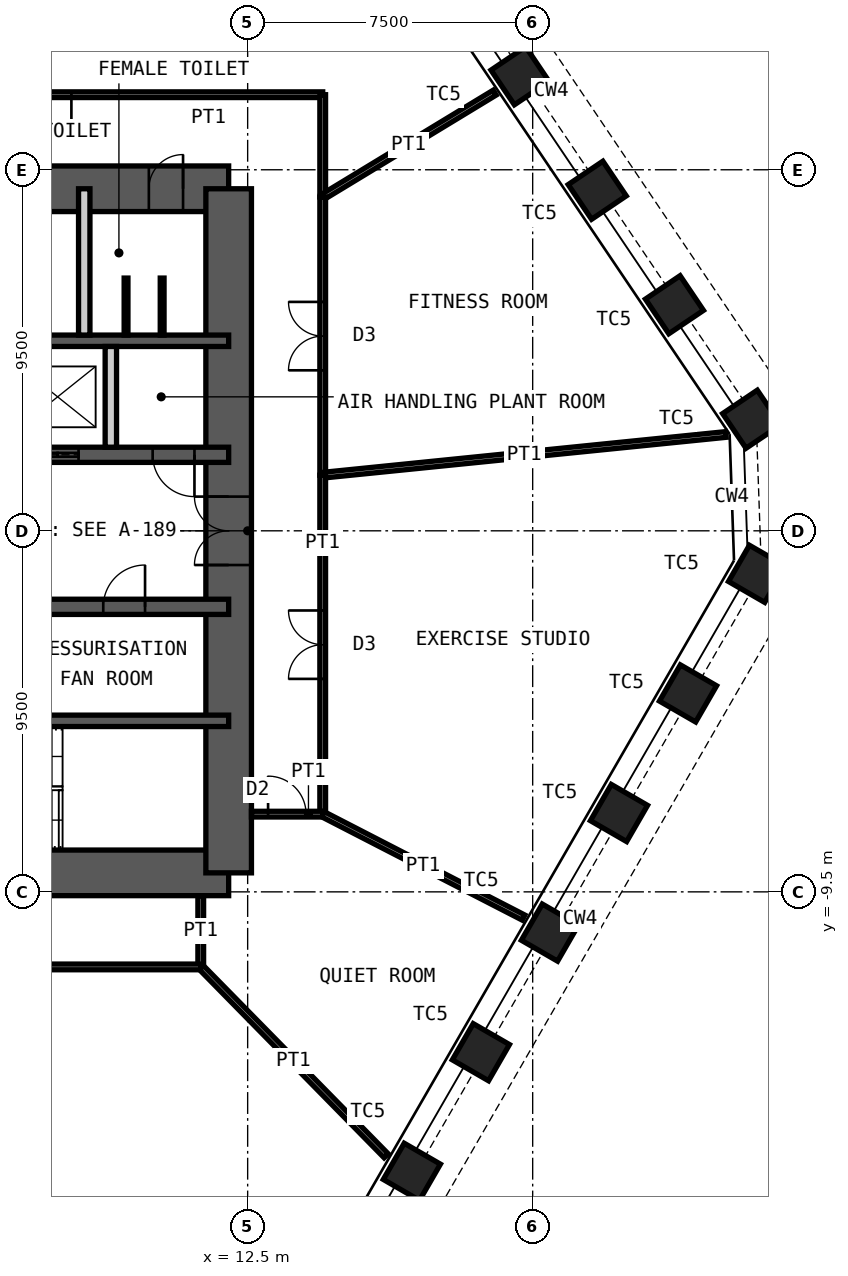
"""IFC4 building model, lengths in metres.
Left out: names, types, materials, properties, quantities, classifications, styles, units other than length and angle.
Written with IfcOpenShell. Run it as: python <this file> out.ifc"""

import sys

from ifc_helpers import new_model, si_unit, direction, frame, frame_2d, origin, origin_2d, place, context, subcontext, project, spatial, rectangle, hollow_rectangle, extrude, element, fill, save


model = new_model("IFC4")
c1 = context("Model", 3, precision=1e-05, world=origin(), true_north=direction((0.0, 1.0)))
c2 = subcontext(c1, "Body", "Model", "MODEL_VIEW")
j1 = project(units=[si_unit("LENGTHUNIT", "METRE"), si_unit("PLANEANGLEUNIT", "RADIAN")], contexts=[c1])
p1 = place(None, origin())
s1 = spatial("IfcSite", under=j1, at=p1, CompositionType="ELEMENT")
p2 = place(p1, origin())
s2 = spatial("IfcBuilding", under=s1, at=p2, CompositionType="ELEMENT")
p3 = place(p2, frame((0.0, 0.0, 218.2)))
s3 = spatial("IfcBuildingStorey", under=s2, at=p3, CompositionType="ELEMENT", Elevation=218.2)
for number, where, z_axis, x_axis in (
    (1, (19.667, 11.973, 0.0), (0.0, 0.0, 1.0), (-0.559, 0.829, 0.0)),
    (2, (21.699, 8.961, 0.0), (0.0, 0.0, 1.0), (-0.559, 0.829, 0.0)),
    (3, (23.731, 5.948, 0.0), (0.0, 0.0, 1.0), (-0.559, 0.829, 0.0)),
    (4, (25.762, 2.936, 0.0), (0.0, 0.0, 1.0), (-0.559, 0.829, 0.0)),
    (5, (25.905, -1.132, 0.0), (0.0, 0.0, 1.0), (0.5, 0.866, 0.0)),
    (6, (24.088, -4.279, 0.0), (0.0, 0.0, 1.0), (0.5, 0.866, 0.0)),
    (7, (22.271, -7.426, 0.0), (0.0, 0.0, 1.0), (0.5, 0.866, 0.0)),
    (8, (20.454, -10.572, 0.0), (0.0, 0.0, 1.0), (0.5, 0.866, 0.0)),
    (9, (18.637, -13.719, 0.0), (0.0, 0.0, 1.0), (0.5, 0.866, 0.0)),
    (10, (16.821, -16.866, 0.0), (0.0, 0.0, 1.0), (0.5, 0.866, 0.0)),
):
    element("IfcColumn", number, at=place(p3, frame(where, z_axis=z_axis, x_axis=x_axis)), inside=s3, PredefinedType="COLUMN", context=c2, shape_type="SweptSolid", body=[
        extrude(hollow_rectangle(XDim=1.1, YDim=1.1, WallThickness=0.07, at=origin_2d()), origin(), (0.0, 0.0, 1.0), 4.2),
    ])
p4 = place(p3, frame((-12.0, 9.0, 0.0), z_axis=(0.0, 0.0, 1.0), x_axis=(1.0, 0.0, 0.0)))
e11 = element("IfcWall", 11, at=p4, inside=s3, PredefinedType="SHEAR", context=c2, shape_type="SweptSolid", body=[
    extrude(rectangle(XDim=24.0, YDim=1.2, at=frame_2d((12.0, 0.0))), origin(), (0.0, 0.0, 1.0), 4.2),
])
p5 = place(p4, frame((10.4, 0.0, 0.0)))
e12 = element("IfcOpeningElement", 12, at=p5, cuts=e11, PredefinedType="OPENING", context=c2, shape_type="SweptSolid", body=[
    extrude(rectangle(XDim=1.0, YDim=2.1, at=frame_2d((0.5, 1.05))), frame((0.0, 0.61, 0.0), z_axis=(0.0, -1.0, 0.0), x_axis=(1.0, 0.0, 0.0)), (0.0, 0.0, 1.0), 1.22),
])
p6 = place(p4, frame((17.6, 0.0, 0.0)))
e13 = element("IfcOpeningElement", 13, at=p6, cuts=e11, PredefinedType="OPENING", context=c2, shape_type="SweptSolid", body=[
    extrude(rectangle(XDim=0.9, YDim=2.1, at=frame_2d((0.45, 1.05))), frame((0.0, 0.61, 0.0), z_axis=(0.0, -1.0, 0.0), x_axis=(1.0, 0.0, 0.0)), (0.0, 0.0, 1.0), 1.22),
])
p7 = place(p4, frame((21.9, 0.0, 0.0)))
e14 = element("IfcOpeningElement", 14, at=p7, cuts=e11, PredefinedType="OPENING", context=c2, shape_type="SweptSolid", body=[
    extrude(rectangle(XDim=0.9, YDim=2.1, at=frame_2d((0.45, 1.05))), frame((0.0, 0.61, 0.0), z_axis=(0.0, -1.0, 0.0), x_axis=(1.0, 0.0, 0.0)), (0.0, 0.0, 1.0), 1.22),
])
p8 = place(p3, frame((-12.0, -9.0, 0.0), z_axis=(0.0, 0.0, 1.0), x_axis=(1.0, 0.0, 0.0)))
e15 = element("IfcWall", 15, at=p8, inside=s3, PredefinedType="SHEAR", context=c2, shape_type="SweptSolid", body=[
    extrude(rectangle(XDim=24.0, YDim=1.2, at=frame_2d((12.0, 0.0))), origin(), (0.0, 0.0, 1.0), 4.2),
])
p9 = place(p8, frame((1.35, 0.0, 0.0)))
e16 = element("IfcOpeningElement", 16, at=p9, cuts=e15, PredefinedType="OPENING", context=c2, shape_type="SweptSolid", body=[
    extrude(rectangle(XDim=1.0, YDim=2.1, at=frame_2d((0.5, 1.05))), frame((0.0, 0.61, 0.0), z_axis=(0.0, -1.0, 0.0), x_axis=(1.0, 0.0, 0.0)), (0.0, 0.0, 1.0), 1.22),
])
p10 = place(p8, frame((5.325, 0.0, 0.0)))
e17 = element("IfcOpeningElement", 17, at=p10, cuts=e15, PredefinedType="OPENING", context=c2, shape_type="SweptSolid", body=[
    extrude(rectangle(XDim=1.15, YDim=2.1, at=frame_2d((0.575, 1.05))), frame((0.0, 0.61, 0.0), z_axis=(0.0, -1.0, 0.0), x_axis=(1.0, 0.0, 0.0)), (0.0, 0.0, 1.0), 1.22),
])
p11 = place(p8, frame((12.6, 0.0, 0.0)))
e18 = element("IfcOpeningElement", 18, at=p11, cuts=e15, PredefinedType="OPENING", context=c2, shape_type="SweptSolid", body=[
    extrude(rectangle(XDim=1.0, YDim=2.1, at=frame_2d((0.5, 1.05))), frame((0.0, 0.61, 0.0), z_axis=(0.0, -1.0, 0.0), x_axis=(1.0, 0.0, 0.0)), (0.0, 0.0, 1.0), 1.22),
])
p12 = place(p3, frame((12.0, -9.0, 0.0), z_axis=(0.0, 0.0, 1.0), x_axis=(0.0, 1.0, 0.0)))
e19 = element("IfcWall", 19, at=p12, inside=s3, PredefinedType="SHEAR", context=c2, shape_type="SweptSolid", body=[
    extrude(rectangle(XDim=18.0, YDim=1.2, at=frame_2d((9.0, 0.0))), origin(), (0.0, 0.0, 1.0), 4.2),
])
p13 = place(p12, frame((8.1, 0.0, 0.0)))
e20 = element("IfcOpeningElement", 20, at=p13, cuts=e19, PredefinedType="OPENING", context=c2, shape_type="SweptSolid", body=[
    extrude(rectangle(XDim=1.8, YDim=2.1, at=frame_2d((0.9, 1.05))), frame((0.0, 0.61, 0.0), z_axis=(0.0, -1.0, 0.0), x_axis=(1.0, 0.0, 0.0)), (0.0, 0.0, 1.0), 1.22),
])
p14 = place(p3, frame((-12.0, 5.0, 0.0), z_axis=(0.0, 0.0, 1.0), x_axis=(1.0, 0.0, 0.0)))
e21 = element("IfcWall", 21, at=p14, inside=s3, PredefinedType="SHEAR", context=c2, shape_type="SweptSolid", body=[
    extrude(rectangle(XDim=24.0, YDim=0.3, at=frame_2d((12.0, 0.0))), origin(), (0.0, 0.0, 1.0), 4.2),
])
p15 = place(p3, frame((-12.0, 2.0, 0.0), z_axis=(0.0, 0.0, 1.0), x_axis=(1.0, 0.0, 0.0)))
e22 = element("IfcWall", 22, at=p15, inside=s3, PredefinedType="SHEAR", context=c2, shape_type="SweptSolid", body=[
    extrude(rectangle(XDim=24.0, YDim=0.4, at=frame_2d((12.0, 0.0))), origin(), (0.0, 0.0, 1.0), 4.2),
])
p16 = place(p15, frame((2.4, 0.0, 0.0)))
e23 = element("IfcOpeningElement", 23, at=p16, cuts=e22, PredefinedType="OPENING", context=c2, shape_type="SweptSolid", body=[
    extrude(rectangle(XDim=1.1, YDim=2.1, at=frame_2d((0.55, 1.05))), frame((0.0, 0.21, 0.0), z_axis=(0.0, -1.0, 0.0), x_axis=(1.0, 0.0, 0.0)), (0.0, 0.0, 1.0), 0.42),
])
p17 = place(p15, frame((22.0, 0.0, 0.0)))
e24 = element("IfcOpeningElement", 24, at=p17, cuts=e22, PredefinedType="OPENING", context=c2, shape_type="SweptSolid", body=[
    extrude(rectangle(XDim=1.1, YDim=2.1, at=frame_2d((0.55, 1.05))), frame((0.0, 0.21, 0.0), z_axis=(0.0, -1.0, 0.0), x_axis=(1.0, 0.0, 0.0)), (0.0, 0.0, 1.0), 0.42),
])
p18 = place(p15, frame((10.15, 0.0, 0.0)))
e25 = element("IfcOpeningElement", 25, at=p18, cuts=e22, PredefinedType="OPENING", context=c2, shape_type="SweptSolid", body=[
    extrude(rectangle(XDim=1.0, YDim=2.1, at=frame_2d((0.5, 1.05))), frame((0.0, 0.21, 0.0), z_axis=(0.0, -1.0, 0.0), x_axis=(1.0, 0.0, 0.0)), (0.0, 0.0, 1.0), 0.42),
])
p19 = place(p15, frame((6.9, 0.0, 0.0)))
e26 = element("IfcOpeningElement", 26, at=p19, cuts=e22, PredefinedType="OPENING", context=c2, shape_type="SweptSolid", body=[
    extrude(rectangle(XDim=1.0, YDim=2.1, at=frame_2d((0.5, 1.05))), frame((0.0, 0.21, 0.0), z_axis=(0.0, -1.0, 0.0), x_axis=(1.0, 0.0, 0.0)), (0.0, 0.0, 1.0), 0.42),
])
p20 = place(p15, frame((13.35, 0.0, 0.0)))
e27 = element("IfcOpeningElement", 27, at=p20, cuts=e22, PredefinedType="OPENING", context=c2, shape_type="SweptSolid", body=[
    extrude(rectangle(XDim=1.1, YDim=2.4, at=frame_2d((0.55, 1.2))), frame((0.0, 0.21, 0.0), z_axis=(0.0, -1.0, 0.0), x_axis=(1.0, 0.0, 0.0)), (0.0, 0.0, 1.0), 0.42),
])
p21 = place(p15, frame((16.15, 0.0, 0.0)))
e28 = element("IfcOpeningElement", 28, at=p21, cuts=e22, PredefinedType="OPENING", context=c2, shape_type="SweptSolid", body=[
    extrude(rectangle(XDim=1.1, YDim=2.4, at=frame_2d((0.55, 1.2))), frame((0.0, 0.21, 0.0), z_axis=(0.0, -1.0, 0.0), x_axis=(1.0, 0.0, 0.0)), (0.0, 0.0, 1.0), 0.42),
])
p22 = place(p15, frame((18.95, 0.0, 0.0)))
e29 = element("IfcOpeningElement", 29, at=p22, cuts=e22, PredefinedType="OPENING", context=c2, shape_type="SweptSolid", body=[
    extrude(rectangle(XDim=1.1, YDim=2.4, at=frame_2d((0.55, 1.2))), frame((0.0, 0.21, 0.0), z_axis=(0.0, -1.0, 0.0), x_axis=(1.0, 0.0, 0.0)), (0.0, 0.0, 1.0), 0.42),
])
p23 = place(p3, frame((-12.0, -2.0, 0.0), z_axis=(0.0, 0.0, 1.0), x_axis=(1.0, 0.0, 0.0)))
e30 = element("IfcWall", 30, at=p23, inside=s3, PredefinedType="SHEAR", context=c2, shape_type="SweptSolid", body=[
    extrude(rectangle(XDim=24.0, YDim=0.4, at=frame_2d((12.0, 0.0))), origin(), (0.0, 0.0, 1.0), 4.2),
])
p24 = place(p23, frame((1.1, 0.0, 0.0)))
e31 = element("IfcOpeningElement", 31, at=p24, cuts=e30, PredefinedType="OPENING", context=c2, shape_type="SweptSolid", body=[
    extrude(rectangle(XDim=1.1, YDim=2.1, at=frame_2d((0.55, 1.05))), frame((0.0, 0.21, 0.0), z_axis=(0.0, -1.0, 0.0), x_axis=(1.0, 0.0, 0.0)), (0.0, 0.0, 1.0), 0.42),
])
p25 = place(p23, frame((13.55, 0.0, 0.0)))
e32 = element("IfcOpeningElement", 32, at=p25, cuts=e30, PredefinedType="OPENING", context=c2, shape_type="SweptSolid", body=[
    extrude(rectangle(XDim=1.1, YDim=2.1, at=frame_2d((0.55, 1.05))), frame((0.0, 0.21, 0.0), z_axis=(0.0, -1.0, 0.0), x_axis=(1.0, 0.0, 0.0)), (0.0, 0.0, 1.0), 0.42),
])
p26 = place(p23, frame((20.7, 0.0, 0.0)))
e33 = element("IfcOpeningElement", 33, at=p26, cuts=e30, PredefinedType="OPENING", context=c2, shape_type="SweptSolid", body=[
    extrude(rectangle(XDim=1.1, YDim=2.1, at=frame_2d((0.55, 1.05))), frame((0.0, 0.21, 0.0), z_axis=(0.0, -1.0, 0.0), x_axis=(1.0, 0.0, 0.0)), (0.0, 0.0, 1.0), 0.42),
])
p27 = place(p23, frame((4.0, 0.0, 0.0)))
e34 = element("IfcOpeningElement", 34, at=p27, cuts=e30, PredefinedType="OPENING", context=c2, shape_type="SweptSolid", body=[
    extrude(rectangle(XDim=1.0, YDim=2.1, at=frame_2d((0.5, 1.05))), frame((0.0, 0.21, 0.0), z_axis=(0.0, -1.0, 0.0), x_axis=(1.0, 0.0, 0.0)), (0.0, 0.0, 1.0), 0.42),
])
p28 = place(p23, frame((6.8, 0.0, 0.0)))
e35 = element("IfcOpeningElement", 35, at=p28, cuts=e30, PredefinedType="OPENING", context=c2, shape_type="SweptSolid", body=[
    extrude(rectangle(XDim=1.0, YDim=2.1, at=frame_2d((0.5, 1.05))), frame((0.0, 0.21, 0.0), z_axis=(0.0, -1.0, 0.0), x_axis=(1.0, 0.0, 0.0)), (0.0, 0.0, 1.0), 0.42),
])
p29 = place(p3, frame((-12.0, -5.0, 0.0), z_axis=(0.0, 0.0, 1.0), x_axis=(1.0, 0.0, 0.0)))
e36 = element("IfcWall", 36, at=p29, inside=s3, PredefinedType="SHEAR", context=c2, shape_type="SweptSolid", body=[
    extrude(rectangle(XDim=24.0, YDim=0.3, at=frame_2d((12.0, 0.0))), origin(), (0.0, 0.0, 1.0), 4.2),
])
p30 = place(p3, frame((8.2, 5.15, 0.0), z_axis=(0.0, 0.0, 1.0), x_axis=(0.0, 1.0, 0.0)))
e37 = element("IfcWall", 37, at=p30, inside=s3, PredefinedType="PARTITIONING", context=c2, shape_type="SweptSolid", body=[
    extrude(rectangle(XDim=3.85, YDim=0.3, at=frame_2d((1.925, 0.0))), origin(), (0.0, 0.0, 1.0), 3.98),
])
p31 = place(p3, frame((8.9, 2.2, 0.0), z_axis=(0.0, 0.0, 1.0), x_axis=(0.0, 1.0, 0.0)))
e38 = element("IfcWall", 38, at=p31, inside=s3, PredefinedType="PARTITIONING", context=c2, shape_type="SweptSolid", body=[
    extrude(rectangle(XDim=2.65, YDim=0.3, at=frame_2d((1.325, 0.0))), origin(), (0.0, 0.0, 1.0), 3.98),
])
for number, where, z_axis, x_axis in (
    (39, (9.3, 5.15, 0.0), (0.0, 0.0, 1.0), (0.0, 1.0, 0.0)),
    (40, (10.25, 5.15, 0.0), (0.0, 0.0, 1.0), (0.0, 1.0, 0.0)),
):
    element("IfcWall", number, at=place(p3, frame(where, z_axis=z_axis, x_axis=x_axis)), inside=s3, PredefinedType="PARTITIONING", context=c2, shape_type="SweptSolid", body=[
        extrude(rectangle(XDim=1.5, YDim=0.1, at=frame_2d((0.75, 0.0))), origin(), (0.0, 0.0, 1.0), 2.1),
    ])
p32 = place(p3, frame((-0.551, 11.475, 0.0), z_axis=(0.0, 0.0, 1.0), x_axis=(1.0, 0.0, 0.0)))
e41 = element("IfcWall", 41, at=p32, inside=s3, PredefinedType="PARTITIONING", context=c2, shape_type="SweptSolid", body=[
    extrude(rectangle(XDim=15.026, YDim=0.15, at=frame_2d((7.513, 0.0))), origin(), (0.0, 0.0, 1.0), 4.03),
])
p33 = place(p32, frame((6.613, 0.0, 0.0)))
e42 = element("IfcOpeningElement", 42, at=p33, cuts=e41, PredefinedType="OPENING", context=c2, shape_type="SweptSolid", body=[
    extrude(rectangle(XDim=1.8, YDim=2.4, at=frame_2d((0.9, 1.2))), frame((0.0, 0.085, 0.0), z_axis=(0.0, -1.0, 0.0), x_axis=(1.0, 0.0, 0.0)), (0.0, 0.0, 1.0), 0.17),
])
p34 = place(p3, frame((14.475, 11.475, 0.0), z_axis=(0.0, 0.0, 1.0), x_axis=(0.0, -1.0, 0.0)))
e43 = element("IfcWall", 43, at=p34, inside=s3, PredefinedType="PARTITIONING", context=c2, shape_type="SweptSolid", body=[
    extrude(rectangle(XDim=2.692, YDim=0.15, at=frame_2d((1.346, 0.0))), origin(), (0.0, 0.0, 1.0), 4.03),
])
p35 = place(p3, frame((19.001, 11.53, 0.0), z_axis=(0.0, 0.0, 1.0), x_axis=(-0.854906581035, -0.518781975114, 0.0)))
e44 = element("IfcWall", 44, at=p35, inside=s3, PredefinedType="PARTITIONING", context=c2, shape_type="SweptSolid", body=[
    extrude(rectangle(XDim=5.294, YDim=0.15, at=frame_2d((2.647, 0.0))), origin(), (0.0, 0.0, 1.0), 3.43),
])
p36 = place(p3, frame((14.475, 8.783, 0.0), z_axis=(0.0, 0.0, 1.0), x_axis=(0.0, -1.0, 0.0)))
e45 = element("IfcWall", 45, at=p36, inside=s3, PredefinedType="PARTITIONING", context=c2, shape_type="SweptSolid", body=[
    extrude(rectangle(XDim=7.321, YDim=0.15, at=frame_2d((3.66, 0.0))), origin(), (0.0, 0.0, 1.0), 4.03),
])
p37 = place(p36, frame((2.76, 0.0, 0.0)))
e46 = element("IfcOpeningElement", 46, at=p37, cuts=e45, PredefinedType="OPENING", context=c2, shape_type="SweptSolid", body=[
    extrude(rectangle(XDim=1.8, YDim=2.4, at=frame_2d((0.9, 1.2))), frame((0.0, 0.085, 0.0), z_axis=(0.0, -1.0, 0.0), x_axis=(1.0, 0.0, 0.0)), (0.0, 0.0, 1.0), 0.17),
])
p38 = place(p3, frame((25.083, 2.535, 0.0), z_axis=(0.0, 0.0, 1.0), x_axis=(-0.994932122767, -0.10054884925, 0.0)))
e47 = element("IfcWall", 47, at=p38, inside=s3, PredefinedType="PARTITIONING", context=c2, shape_type="SweptSolid", body=[
    extrude(rectangle(XDim=10.662, YDim=0.15, at=frame_2d((5.331, 0.0))), origin(), (0.0, 0.0, 1.0), 2.93),
])
p39 = place(p3, frame((14.475, 1.463, 0.0), z_axis=(0.0, 0.0, 1.0), x_axis=(0.0, -1.0, 0.0)))
e48 = element("IfcWall", 48, at=p39, inside=s3, PredefinedType="PARTITIONING", context=c2, shape_type="SweptSolid", body=[
    extrude(rectangle(XDim=8.918, YDim=0.15, at=frame_2d((4.459, 0.0))), origin(), (0.0, 0.0, 1.0), 4.03),
])
p40 = place(p39, frame((3.559, 0.0, 0.0)))
e49 = element("IfcOpeningElement", 49, at=p40, cuts=e48, PredefinedType="OPENING", context=c2, shape_type="SweptSolid", body=[
    extrude(rectangle(XDim=1.8, YDim=2.4, at=frame_2d((0.9, 1.2))), frame((0.0, 0.085, 0.0), z_axis=(0.0, -1.0, 0.0), x_axis=(1.0, 0.0, 0.0)), (0.0, 0.0, 1.0), 0.17),
])
p41 = place(p3, frame((19.759, -10.177, 0.0), z_axis=(0.0, 0.0, 1.0), x_axis=(-0.889015092721, 0.457877893017, 0.0)))
e50 = element("IfcWall", 50, at=p41, inside=s3, PredefinedType="PARTITIONING", context=c2, shape_type="SweptSolid", body=[
    extrude(rectangle(XDim=5.944, YDim=0.15, at=frame_2d((2.972, 0.0))), origin(), (0.0, 0.0, 1.0), 3.43),
])
p42 = place(p3, frame((14.475, -7.455, 0.0), z_axis=(0.0, 0.0, 1.0), x_axis=(-1.0, 0.0, 0.0)))
e51 = element("IfcWall", 51, at=p42, inside=s3, PredefinedType="PARTITIONING", context=c2, shape_type="SweptSolid", body=[
    extrude(rectangle(XDim=1.875, YDim=0.15, at=frame_2d((0.938, 0.0))), origin(), (0.0, 0.0, 1.0), 4.03),
])
p43 = place(p42, frame((0.438, 0.0, 0.0)))
e52 = element("IfcOpeningElement", 52, at=p43, cuts=e51, PredefinedType="OPENING", context=c2, shape_type="SweptSolid", body=[
    extrude(rectangle(XDim=1.0, YDim=2.4, at=frame_2d((0.5, 1.2))), frame((0.0, 0.085, 0.0), z_axis=(0.0, -1.0, 0.0), x_axis=(1.0, 0.0, 0.0)), (0.0, 0.0, 1.0), 0.17),
])
p44 = place(p3, frame((11.266, -9.6, 0.0), z_axis=(0.0, 0.0, 1.0), x_axis=(0.0, -1.0, 0.0)))
e53 = element("IfcWall", 53, at=p44, inside=s3, PredefinedType="PARTITIONING", context=c2, shape_type="SweptSolid", body=[
    extrude(rectangle(XDim=1.875, YDim=0.15, at=frame_2d((0.938, 0.0))), origin(), (0.0, 0.0, 1.0), 4.03),
])
p45 = place(p3, frame((16.145, -16.444, 0.0), z_axis=(0.0, 0.0, 1.0), x_axis=(-0.700591378209, 0.71356269576, 0.0)))
e54 = element("IfcWall", 54, at=p45, inside=s3, PredefinedType="PARTITIONING", context=c2, shape_type="SweptSolid", body=[
    extrude(rectangle(XDim=6.964, YDim=0.15, at=frame_2d((3.482, 0.0))), origin(), (0.0, 0.0, 1.0), 3.43),
])
p46 = place(p3, frame((11.266, -11.475, 0.0), z_axis=(0.0, 0.0, 1.0), x_axis=(-1.0, 0.0, 0.0)))
e55 = element("IfcWall", 55, at=p46, inside=s3, PredefinedType="PARTITIONING", context=c2, shape_type="SweptSolid", body=[
    extrude(rectangle(XDim=11.015, YDim=0.15, at=frame_2d((5.508, 0.0))), origin(), (0.0, 0.0, 1.0), 4.03),
])
p47 = place(p46, frame((4.608, 0.0, 0.0)))
e56 = element("IfcOpeningElement", 56, at=p47, cuts=e55, PredefinedType="OPENING", context=c2, shape_type="SweptSolid", body=[
    extrude(rectangle(XDim=1.8, YDim=2.4, at=frame_2d((0.9, 1.2))), frame((0.0, 0.085, 0.0), z_axis=(0.0, -1.0, 0.0), x_axis=(1.0, 0.0, 0.0)), (0.0, 0.0, 1.0), 0.17),
])
p48 = place(p7, origin())
e57 = element("IfcDoor", 57, at=p48, inside=s3, OperationType="SINGLE_SWING_LEFT", PredefinedType="DOOR", context=c2, shape_type="SweptSolid", body=[
    extrude(rectangle(XDim=0.9, YDim=2.1, at=frame_2d((0.45, 1.05))), frame((0.0, 0.025, 0.0), z_axis=(0.0, -1.0, 0.0), x_axis=(1.0, 0.0, 0.0)), (0.0, 0.0, 1.0), 0.05),
])
fill(e14, e57)
p49 = place(p17, origin())
e58 = element("IfcDoor", 58, at=p49, inside=s3, OperationType="SINGLE_SWING_RIGHT", PredefinedType="DOOR", context=c2, shape_type="SweptSolid", body=[
    extrude(rectangle(XDim=1.1, YDim=2.1, at=frame_2d((0.55, 1.05))), frame((0.0, 0.025, 0.0), z_axis=(0.0, -1.0, 0.0), x_axis=(1.0, 0.0, 0.0)), (0.0, 0.0, 1.0), 0.05),
])
fill(e24, e58)
p50 = place(p26, origin())
e59 = element("IfcDoor", 59, at=p50, inside=s3, OperationType="SINGLE_SWING_LEFT", PredefinedType="DOOR", context=c2, shape_type="SweptSolid", body=[
    extrude(rectangle(XDim=1.1, YDim=2.1, at=frame_2d((0.55, 1.05))), frame((0.0, 0.025, 0.0), z_axis=(0.0, -1.0, 0.0), x_axis=(1.0, 0.0, 0.0)), (0.0, 0.0, 1.0), 0.05),
])
fill(e33, e59)
p51 = place(p13, origin())
e60 = element("IfcDoor", 60, at=p51, inside=s3, OperationType="DOUBLE_DOOR_DOUBLE_SWING", PredefinedType="DOOR", context=c2, shape_type="SweptSolid", body=[
    extrude(rectangle(XDim=1.8, YDim=2.1, at=frame_2d((0.9, 1.05))), frame((0.0, 0.025, 0.0), z_axis=(0.0, -1.0, 0.0), x_axis=(1.0, 0.0, 0.0)), (0.0, 0.0, 1.0), 0.05),
])
fill(e20, e60)
p52 = place(p22, origin())
e61 = element("IfcDoor", 61, at=p52, inside=s3, OperationType="DOUBLE_DOOR_SLIDING", PredefinedType="DOOR", context=c2, shape_type="SweptSolid", body=[
    extrude(rectangle(XDim=1.1, YDim=2.4, at=frame_2d((0.55, 1.2))), frame((0.0, 0.025, 0.0), z_axis=(0.0, -1.0, 0.0), x_axis=(1.0, 0.0, 0.0)), (0.0, 0.0, 1.0), 0.05),
])
fill(e29, e61)
p53 = place(p33, origin())
e62 = element("IfcDoor", 62, at=p53, inside=s3, OperationType="DOUBLE_DOOR_DOUBLE_SWING", PredefinedType="DOOR", context=c2, shape_type="SweptSolid", body=[
    extrude(rectangle(XDim=1.8, YDim=2.4, at=frame_2d((0.9, 1.2))), frame((0.0, 0.025, 0.0), z_axis=(0.0, -1.0, 0.0), x_axis=(1.0, 0.0, 0.0)), (0.0, 0.0, 1.0), 0.05),
])
fill(e42, e62)
p54 = place(p37, origin())
e63 = element("IfcDoor", 63, at=p54, inside=s3, OperationType="DOUBLE_DOOR_DOUBLE_SWING", PredefinedType="DOOR", context=c2, shape_type="SweptSolid", body=[
    extrude(rectangle(XDim=1.8, YDim=2.4, at=frame_2d((0.9, 1.2))), frame((0.0, 0.025, 0.0), z_axis=(0.0, -1.0, 0.0), x_axis=(1.0, 0.0, 0.0)), (0.0, 0.0, 1.0), 0.05),
])
fill(e46, e63)
p55 = place(p40, origin())
e64 = element("IfcDoor", 64, at=p55, inside=s3, OperationType="DOUBLE_DOOR_DOUBLE_SWING", PredefinedType="DOOR", context=c2, shape_type="SweptSolid", body=[
    extrude(rectangle(XDim=1.8, YDim=2.4, at=frame_2d((0.9, 1.2))), frame((0.0, 0.025, 0.0), z_axis=(0.0, -1.0, 0.0), x_axis=(1.0, 0.0, 0.0)), (0.0, 0.0, 1.0), 0.05),
])
fill(e49, e64)
p56 = place(p43, origin())
e65 = element("IfcDoor", 65, at=p56, inside=s3, OperationType="SINGLE_SWING_RIGHT", PredefinedType="DOOR", context=c2, shape_type="SweptSolid", body=[
    extrude(rectangle(XDim=1.0, YDim=2.4, at=frame_2d((0.5, 1.2))), frame((0.0, 0.025, 0.0), z_axis=(0.0, -1.0, 0.0), x_axis=(1.0, 0.0, 0.0)), (0.0, 0.0, 1.0), 0.05),
])
fill(e52, e65)
save(model, sys.argv[1])
